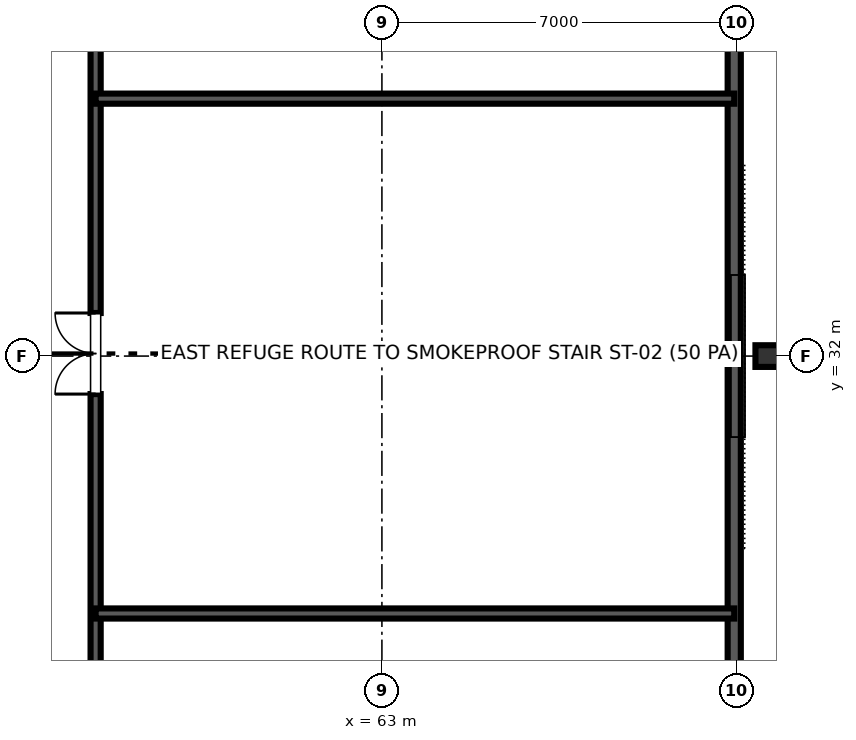
"""IFC4 building model, lengths in metres.
Left out: names, types, materials, properties, quantities, classifications, styles, units other than length and angle.
Written with IfcOpenShell. Run it as: python <this file> out.ifc"""

import sys

from ifc_helpers import new_model, si_unit, direction, frame, frame_2d, origin, origin_2d, place, context, subcontext, project, spatial, rectangle, i_section, extrude, element, fill, save


model = new_model("IFC4")
c1 = context("Model", 3, precision=1e-05, world=origin(), true_north=direction((0.0, 1.0)))
c2 = subcontext(c1, "Body", "Model", "MODEL_VIEW")
j1 = project(units=[si_unit("LENGTHUNIT", "METRE"), si_unit("PLANEANGLEUNIT", "RADIAN")], contexts=[c1])
p1 = place(None, origin())
s1 = spatial("IfcSite", under=j1, at=p1, CompositionType="ELEMENT")
p2 = place(p1, origin())
s2 = spatial("IfcBuilding", under=s1, at=p2, CompositionType="ELEMENT")
p3 = place(p2, frame((0.0, 0.0, 85.6)))
s3 = spatial("IfcBuildingStorey", under=s2, at=p3, CompositionType="ELEMENT", Elevation=85.6)
p4 = place(p3, frame((70.613, 32.0, 0.0), z_axis=(-0.048305138147, 0.0, 0.998832625433), x_axis=(0.998832625433, 0.0, 0.048305138147)))
e1 = element("IfcColumn", 1, at=p4, inside=s3, PredefinedType="COLUMN", context=c2, shape_type="SweptSolid", body=[
    extrude(i_section(OverallWidth=0.428, OverallDepth=0.483, WebThickness=0.051, FlangeThickness=0.082, FilletRadius=0.025, at=origin_2d()), origin(), (0.0, 0.0, 1.0), 4.483),
])
p5 = place(p3, frame((69.953, 14.893, 0.0), z_axis=(0.0, 0.0, 1.0), x_axis=(0.0, 1.0, 0.0)))
e2 = element("IfcWall", 2, at=p5, inside=s3, PredefinedType="STANDARD", context=c2, shape_type="SweptSolid", body=[
    extrude(rectangle(XDim=34.213, YDim=0.26, at=frame_2d((17.107, 0.0))), origin(), (0.0, 0.0, 1.0), 4.48),
])
p6 = place(p3, frame((57.35, 21.65, 0.0), z_axis=(0.0, 0.0, 1.0), x_axis=(0.0, 1.0, 0.0)))
e3 = element("IfcWall", 3, at=p6, inside=s3, PredefinedType="PARTITIONING", context=c2, shape_type="SweptSolid", body=[
    extrude(rectangle(XDim=20.7, YDim=0.2, at=frame_2d((10.35, 0.0))), origin(), (0.0, 0.0, 1.0), 3.41),
])
p7 = place(p6, frame((9.6, 0.0, 0.0)))
e4 = element("IfcOpeningElement", 4, at=p7, cuts=e3, PredefinedType="OPENING", context=c2, shape_type="SweptSolid", body=[
    extrude(rectangle(XDim=1.6, YDim=2.15, at=frame_2d((0.8, 1.075))), frame((0.0, 0.11, 0.0), z_axis=(0.0, -1.0, 0.0), x_axis=(1.0, 0.0, 0.0)), (0.0, 0.0, 1.0), 0.22),
])
for number, where, z_axis, x_axis in (
    (5, (57.35, 26.92, 0.0), (0.0, 0.0, 1.0), (1.0, 0.0, 0.0)),
    (6, (57.35, 37.08, 0.0), (0.0, 0.0, 1.0), (1.0, 0.0, 0.0)),
):
    element("IfcWall", number, at=place(p3, frame(where, z_axis=z_axis, x_axis=x_axis)), inside=s3, PredefinedType="PARTITIONING", context=c2, shape_type="SweptSolid", body=[
        extrude(rectangle(XDim=12.603, YDim=0.2, at=frame_2d((6.302, 0.0))), origin(), (0.0, 0.0, 1.0), 3.41),
    ])
p8 = place(p7, origin())
e7 = element("IfcDoor", 7, at=p8, inside=s3, OperationType="DOUBLE_DOOR_SINGLE_SWING", PredefinedType="DOOR", context=c2, shape_type="SweptSolid", body=[
    extrude(rectangle(XDim=1.6, YDim=2.15, at=frame_2d((0.8, 1.075))), frame((0.0, 0.025, 0.0), z_axis=(0.0, -1.0, 0.0), x_axis=(1.0, 0.0, 0.0)), (0.0, 0.0, 1.0), 0.05),
])
fill(e4, e7)
save(model, sys.argv[1])
